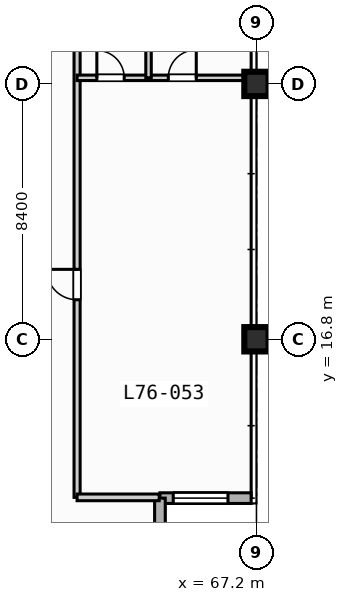
"""IFC4 building model, lengths in metres.
Left out: names, types, materials, properties, quantities, classifications, styles, units other than length and angle.
Written with IfcOpenShell. Run it as: python <this file> out.ifc"""

import sys

from ifc_helpers import new_model, si_unit, direction, frame, frame_2d, origin, origin_2d, place, context, subcontext, project, spatial, rectangle, extrude, element, fill, save


model = new_model("IFC4")
c1 = context("Model", 3, precision=1e-05, world=origin(), true_north=direction((0.0, 1.0)))
c2 = subcontext(c1, "Body", "Model", "MODEL_VIEW")
j1 = project(units=[si_unit("LENGTHUNIT", "METRE"), si_unit("PLANEANGLEUNIT", "RADIAN")], contexts=[c1])
p1 = place(None, origin())
s1 = spatial("IfcSite", under=j1, at=p1, CompositionType="ELEMENT")
p2 = place(p1, origin())
s2 = spatial("IfcBuilding", under=s1, at=p2, CompositionType="ELEMENT")
p3 = place(p2, frame((0.0, 0.0, 308.6)))
s3 = spatial("IfcBuildingStorey", under=s2, at=p3, CompositionType="ELEMENT", Elevation=308.6)
for number, where, z_axis, x_axis in (
    (1, (67.2, 16.8, 0.0), (0.0, 0.0, 1.0), (1.0, 0.0, 0.0)),
    (2, (67.2, 25.2, 0.0), (0.0, 0.0, 1.0), (1.0, 0.0, 0.0)),
):
    element("IfcColumn", number, at=place(p3, frame(where, z_axis=z_axis, x_axis=x_axis)), inside=s3, PredefinedType="COLUMN", context=c2, shape_type="SweptSolid", body=[
        extrude(rectangle(XDim=0.8, YDim=0.8, at=origin_2d()), origin(), (0.0, 0.0, 1.0), 3.9),
    ])
p4 = place(p3, frame((67.025, 11.575, 0.0), z_axis=(0.0, 0.0, 1.0), x_axis=(-1.0, 0.0, 0.0)))
e3 = element("IfcWall", 3, at=p4, inside=s3, PredefinedType="STANDARD", context=c2, shape_type="SweptSolid", body=[
    extrude(rectangle(XDim=3.0, YDim=0.35, at=frame_2d((1.5, 0.0))), origin(), (0.0, 0.0, 1.0), 3.67),
])
p5 = place(p4, frame((0.762, 0.0, 0.85)))
e4 = element("IfcOpeningElement", 4, at=p5, cuts=e3, PredefinedType="OPENING", context=c2, shape_type="SweptSolid", body=[
    extrude(rectangle(XDim=1.8, YDim=1.8, at=frame_2d((0.9, 0.9))), frame((0.0, 0.185, 0.0), z_axis=(0.0, -1.0, 0.0), x_axis=(1.0, 0.0, 0.0)), (0.0, 0.0, 1.0), 0.37),
])
p6 = place(p3, frame((64.025, 11.575, 0.0), z_axis=(0.0, 0.0, 1.0), x_axis=(0.0, -1.0, 0.0)))
e5 = element("IfcWall", 5, at=p6, inside=s3, PredefinedType="STANDARD", context=c2, shape_type="SweptSolid", body=[
    extrude(rectangle(XDim=3.0, YDim=0.35, at=frame_2d((1.5, 0.0))), origin(), (0.0, 0.0, 1.0), 3.67),
])
p7 = place(p3, frame((61.3, 11.6, 0.0), z_axis=(0.0, 0.0, 1.0), x_axis=(0.0, 1.0, 0.0)))
e6 = element("IfcWall", 6, at=p7, inside=s3, PredefinedType="PARTITIONING", context=c2, shape_type="SweptSolid", body=[
    extrude(rectangle(XDim=18.8, YDim=0.2, at=frame_2d((9.4, 0.0))), origin(), (0.0, 0.0, 1.0), 3.67),
])
p8 = place(p7, frame((6.5, 0.0, 0.0)))
e7 = element("IfcOpeningElement", 7, at=p8, cuts=e6, PredefinedType="OPENING", context=c2, shape_type="SweptSolid", body=[
    extrude(rectangle(XDim=1.0, YDim=2.15, at=frame_2d((0.5, 1.075))), frame((0.0, 0.11, 0.0), z_axis=(0.0, -1.0, 0.0), x_axis=(1.0, 0.0, 0.0)), (0.0, 0.0, 1.0), 0.22),
])
p9 = place(p3, frame((61.3, 25.4, 0.0), z_axis=(0.0, 0.0, 1.0), x_axis=(1.0, 0.0, 0.0)))
e8 = element("IfcWall", 8, at=p9, inside=s3, PredefinedType="PLUMBINGWALL", context=c2, shape_type="SweptSolid", body=[
    extrude(rectangle(XDim=5.5, YDim=0.18, at=frame_2d((2.75, 0.0))), origin(), (0.0, 0.0, 1.0), 3.07),
])
p10 = place(p9, frame((0.65, 0.0, 0.0)))
e9 = element("IfcOpeningElement", 9, at=p10, cuts=e8, PredefinedType="OPENING", context=c2, shape_type="SweptSolid", body=[
    extrude(rectangle(XDim=0.9, YDim=2.1, at=frame_2d((0.45, 1.05))), frame((0.0, 0.1, 0.0), z_axis=(0.0, -1.0, 0.0), x_axis=(1.0, 0.0, 0.0)), (0.0, 0.0, 1.0), 0.2),
])
p11 = place(p9, frame((3.0, 0.0, 0.0)))
e10 = element("IfcOpeningElement", 10, at=p11, cuts=e8, PredefinedType="OPENING", context=c2, shape_type="SweptSolid", body=[
    extrude(rectangle(XDim=0.92, YDim=2.1, at=frame_2d((0.46, 1.05))), frame((0.0, 0.1, 0.0), z_axis=(0.0, -1.0, 0.0), x_axis=(1.0, 0.0, 0.0)), (0.0, 0.0, 1.0), 0.2),
])
p12 = place(p3, frame((63.65, 25.4, 0.0), z_axis=(0.0, 0.0, 1.0), x_axis=(0.0, 1.0, 0.0)))
e11 = element("IfcWall", 11, at=p12, inside=s3, PredefinedType="PLUMBINGWALL", context=c2, shape_type="SweptSolid", body=[
    extrude(rectangle(XDim=5.0, YDim=0.18, at=frame_2d((2.5, 0.0))), origin(), (0.0, 0.0, 1.0), 3.67),
])
p13 = place(p3, frame((61.3, 11.6, 0.0), z_axis=(0.0, 0.0, 1.0), x_axis=(1.0, 0.0, 0.0)))
e12 = element("IfcWall", 12, at=p13, inside=s3, PredefinedType="PARTITIONING", context=c2, shape_type="SweptSolid", body=[
    extrude(rectangle(XDim=2.7, YDim=0.22, at=frame_2d((1.35, 0.0))), origin(), (0.0, 0.0, 1.0), 3.67),
])
p14 = place(p5, origin())
e13 = element("IfcWindow", 13, at=p14, inside=s3, PartitioningType="SINGLE_PANEL", PredefinedType="WINDOW", context=c2, shape_type="SweptSolid", body=[
    extrude(rectangle(XDim=1.8, YDim=1.8, at=frame_2d((0.9, 0.9))), frame((0.0, 0.03, 0.0), z_axis=(0.0, -1.0, 0.0), x_axis=(1.0, 0.0, 0.0)), (0.0, 0.0, 1.0), 0.06),
])
fill(e4, e13)
p15 = place(p8, origin())
e14 = element("IfcDoor", 14, at=p15, inside=s3, OperationType="SINGLE_SWING_RIGHT", PredefinedType="DOOR", context=c2, shape_type="SweptSolid", body=[
    extrude(rectangle(XDim=1.0, YDim=2.15, at=frame_2d((0.5, 1.075))), frame((0.0, 0.025, 0.0), z_axis=(0.0, -1.0, 0.0), x_axis=(1.0, 0.0, 0.0)), (0.0, 0.0, 1.0), 0.05),
])
fill(e7, e14)
p16 = place(p10, origin())
e15 = element("IfcDoor", 15, at=p16, inside=s3, OperationType="SINGLE_SWING_LEFT", PredefinedType="DOOR", context=c2, shape_type="SweptSolid", body=[
    extrude(rectangle(XDim=0.9, YDim=2.1, at=frame_2d((0.45, 1.05))), frame((0.0, 0.025, 0.0), z_axis=(0.0, -1.0, 0.0), x_axis=(1.0, 0.0, 0.0)), (0.0, 0.0, 1.0), 0.05),
])
fill(e9, e15)
p17 = place(p11, origin())
e16 = element("IfcDoor", 16, at=p17, inside=s3, OperationType="SINGLE_SWING_RIGHT", PredefinedType="DOOR", context=c2, shape_type="SweptSolid", body=[
    extrude(rectangle(XDim=0.92, YDim=2.1, at=frame_2d((0.46, 1.05))), frame((0.0, 0.025, 0.0), z_axis=(0.0, -1.0, 0.0), x_axis=(1.0, 0.0, 0.0)), (0.0, 0.0, 1.0), 0.05),
])
fill(e10, e16)
save(model, sys.argv[1])
